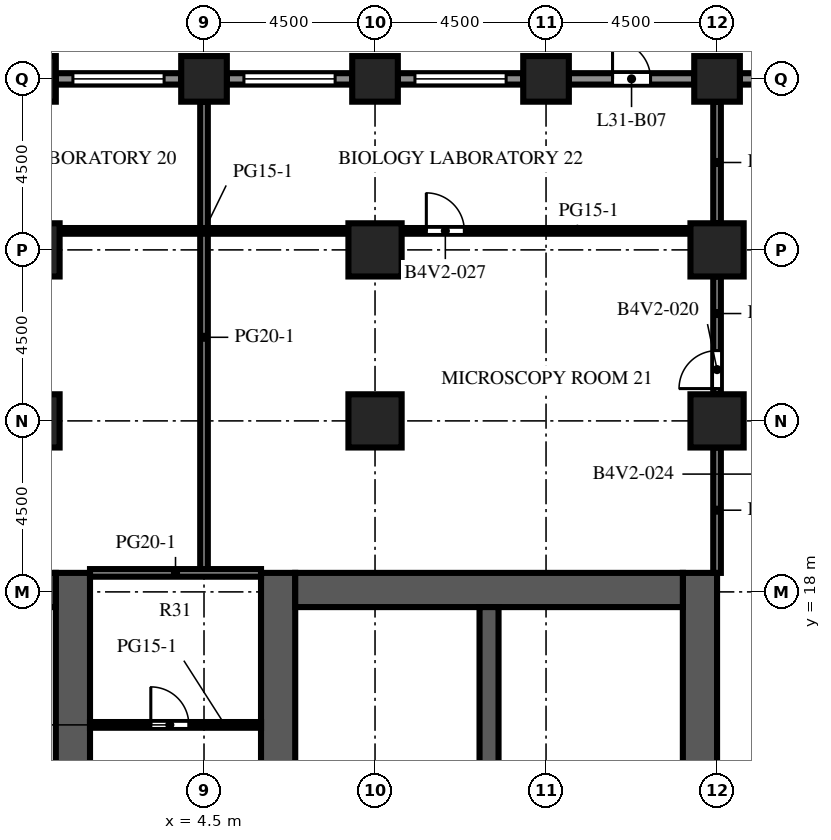
"""IFC4 building model, lengths in metres.
Left out: names, types, materials, properties, quantities, classifications, styles, units other than length and angle.
Written with IfcOpenShell. Run it as: python <this file> out.ifc"""

import sys

from ifc_helpers import new_model, si_unit, direction, frame, frame_2d, origin, origin_2d, place, context, subcontext, project, spatial, rectangle, extrude, element, fill, save


model = new_model("IFC4")
c1 = context("Model", 3, precision=1e-05, world=origin(), true_north=direction((0.0, 1.0)))
c2 = subcontext(c1, "Body", "Model", "MODEL_VIEW")
j1 = project(units=[si_unit("LENGTHUNIT", "METRE"), si_unit("PLANEANGLEUNIT", "RADIAN")], contexts=[c1])
p1 = place(None, origin())
s1 = spatial("IfcSite", under=j1, at=p1, CompositionType="ELEMENT")
p2 = place(p1, origin())
s2 = spatial("IfcBuilding", under=s1, at=p2, CompositionType="ELEMENT")
p3 = place(p2, frame((0.0, 0.0, 137.2)))
s3 = spatial("IfcBuildingStorey", under=s2, at=p3, CompositionType="ELEMENT", Elevation=137.2)
for number, where, z_axis, x_axis in (
    (1, (0.0, 31.5, 0.0), (0.0, 0.0, 1.0), (1.0, 0.0, 0.0)),
    (2, (4.5, 31.5, 0.0), (0.0, 0.0, 1.0), (1.0, 0.0, 0.0)),
    (3, (9.0, 31.5, 0.0), (0.0, 0.0, 1.0), (1.0, 0.0, 0.0)),
    (4, (13.5, 31.5, 0.0), (0.0, 0.0, 1.0), (1.0, 0.0, 0.0)),
    (5, (18.0, 31.5, 0.0), (0.0, 0.0, 1.0), (1.0, 0.0, 0.0)),
):
    element("IfcColumn", number, at=place(p3, frame(where, z_axis=z_axis, x_axis=x_axis)), inside=s3, PredefinedType="COLUMN", context=c2, shape_type="SweptSolid", body=[
        extrude(rectangle(XDim=1.2, YDim=1.2, at=origin_2d()), origin(), (0.0, 0.0, 1.0), 4.1),
    ])
for number, where, z_axis, x_axis in (
    (6, (0.0, 22.5, 0.0), (0.0, 0.0, 1.0), (1.0, 0.0, 0.0)),
    (7, (0.0, 27.0, 0.0), (0.0, 0.0, 1.0), (1.0, 0.0, 0.0)),
    (8, (9.0, 22.5, 0.0), (0.0, 0.0, 1.0), (1.0, 0.0, 0.0)),
    (9, (9.0, 27.0, 0.0), (0.0, 0.0, 1.0), (1.0, 0.0, 0.0)),
    (10, (18.0, 22.5, 0.0), (0.0, 0.0, 1.0), (1.0, 0.0, 0.0)),
    (11, (18.0, 27.0, 0.0), (0.0, 0.0, 1.0), (1.0, 0.0, 0.0)),
):
    element("IfcColumn", number, at=place(p3, frame(where, z_axis=z_axis, x_axis=x_axis)), inside=s3, PredefinedType="COLUMN", context=c2, shape_type="SweptSolid", body=[
        extrude(rectangle(XDim=1.4, YDim=1.4, at=origin_2d()), origin(), (0.0, 0.0, 1.0), 4.1),
    ])
p4 = place(p3, frame((1.05, -9.0, 0.0), z_axis=(0.0, 0.0, 1.0), x_axis=(0.0, 1.0, 0.0)))
e12 = element("IfcWall", 12, at=p4, inside=s3, PredefinedType="SHEAR", context=c2, shape_type="SweptSolid", body=[
    extrude(rectangle(XDim=27.5, YDim=0.9, at=frame_2d((13.75, 0.0))), origin(), (0.0, 0.0, 1.0), 4.1),
])
p5 = place(p4, frame((12.55, 0.0, 0.0)))
e13 = element("IfcOpeningElement", 13, at=p5, cuts=e12, PredefinedType="OPENING", context=c2, shape_type="SweptSolid", body=[
    extrude(rectangle(XDim=2.4, YDim=2.4, at=frame_2d((1.2, 1.2))), frame((0.0, 0.46, 0.0), z_axis=(0.0, -1.0, 0.0), x_axis=(1.0, 0.0, 0.0)), (0.0, 0.0, 1.0), 0.92),
])
p6 = place(p4, frame((5.51, 0.0, 0.0)))
e14 = element("IfcOpeningElement", 14, at=p6, cuts=e12, PredefinedType="OPENING", context=c2, shape_type="SweptSolid", body=[
    extrude(rectangle(XDim=0.923, YDim=2.1, at=frame_2d((0.461, 1.05))), frame((0.0, 0.46, 0.0), z_axis=(0.0, -1.0, 0.0), x_axis=(1.0, 0.0, 0.0)), (0.0, 0.0, 1.0), 0.92),
])
p7 = place(p4, frame((23.427, 0.0, 0.0)))
e15 = element("IfcOpeningElement", 15, at=p7, cuts=e12, PredefinedType="OPENING", context=c2, shape_type="SweptSolid", body=[
    extrude(rectangle(XDim=1.2, YDim=2.1, at=frame_2d((0.6, 1.05))), frame((0.0, 0.46, 0.0), z_axis=(0.0, -1.0, 0.0), x_axis=(1.0, 0.0, 0.0)), (0.0, 0.0, 1.0), 0.92),
])
p8 = place(p3, frame((-9.6, 18.05, 0.0), z_axis=(0.0, 0.0, 1.0), x_axis=(1.0, 0.0, 0.0)))
e16 = element("IfcWall", 16, at=p8, inside=s3, PredefinedType="SHEAR", context=c2, shape_type="SweptSolid", body=[
    extrude(rectangle(XDim=10.2, YDim=0.9, at=frame_2d((5.1, 0.0))), origin(), (0.0, 0.0, 1.0), 4.1),
])
p9 = place(p3, frame((6.45, -9.0, 0.0), z_axis=(0.0, 0.0, 1.0), x_axis=(0.0, 1.0, 0.0)))
e17 = element("IfcWall", 17, at=p9, inside=s3, PredefinedType="SHEAR", context=c2, shape_type="SweptSolid", body=[
    extrude(rectangle(XDim=27.5, YDim=0.9, at=frame_2d((13.75, 0.0))), origin(), (0.0, 0.0, 1.0), 4.1),
])
p10 = place(p9, frame((12.55, 0.0, 0.0)))
e18 = element("IfcOpeningElement", 18, at=p10, cuts=e17, PredefinedType="OPENING", context=c2, shape_type="SweptSolid", body=[
    extrude(rectangle(XDim=2.4, YDim=2.4, at=frame_2d((1.2, 1.2))), frame((0.0, 0.46, 0.0), z_axis=(0.0, -1.0, 0.0), x_axis=(1.0, 0.0, 0.0)), (0.0, 0.0, 1.0), 0.92),
])
p11 = place(p9, frame((5.51, 0.0, 0.0)))
e19 = element("IfcOpeningElement", 19, at=p11, cuts=e17, PredefinedType="OPENING", context=c2, shape_type="SweptSolid", body=[
    extrude(rectangle(XDim=0.923, YDim=2.1, at=frame_2d((0.461, 1.05))), frame((0.0, 0.46, 0.0), z_axis=(0.0, -1.0, 0.0), x_axis=(1.0, 0.0, 0.0)), (0.0, 0.0, 1.0), 0.92),
])
p12 = place(p9, frame((23.427, 0.0, 0.0)))
e20 = element("IfcOpeningElement", 20, at=p12, cuts=e17, PredefinedType="OPENING", context=c2, shape_type="SweptSolid", body=[
    extrude(rectangle(XDim=1.2, YDim=2.1, at=frame_2d((0.6, 1.05))), frame((0.0, 0.46, 0.0), z_axis=(0.0, -1.0, 0.0), x_axis=(1.0, 0.0, 0.0)), (0.0, 0.0, 1.0), 0.92),
])
p13 = place(p3, frame((17.55, -9.0, 0.0), z_axis=(0.0, 0.0, 1.0), x_axis=(0.0, 1.0, 0.0)))
e21 = element("IfcWall", 21, at=p13, inside=s3, PredefinedType="SHEAR", context=c2, shape_type="SweptSolid", body=[
    extrude(rectangle(XDim=27.5, YDim=0.9, at=frame_2d((13.75, 0.0))), origin(), (0.0, 0.0, 1.0), 4.1),
])
p14 = place(p13, frame((12.55, 0.0, 0.0)))
e22 = element("IfcOpeningElement", 22, at=p14, cuts=e21, PredefinedType="OPENING", context=c2, shape_type="SweptSolid", body=[
    extrude(rectangle(XDim=2.4, YDim=2.4, at=frame_2d((1.2, 1.2))), frame((0.0, 0.46, 0.0), z_axis=(0.0, -1.0, 0.0), x_axis=(1.0, 0.0, 0.0)), (0.0, 0.0, 1.0), 0.92),
])
p15 = place(p13, frame((6.825, 0.0, 0.0)))
e23 = element("IfcOpeningElement", 23, at=p15, cuts=e21, PredefinedType="OPENING", context=c2, shape_type="SweptSolid", body=[
    extrude(rectangle(XDim=1.2, YDim=2.1, at=frame_2d((0.6, 1.05))), frame((0.0, 0.46, 0.0), z_axis=(0.0, -1.0, 0.0), x_axis=(1.0, 0.0, 0.0)), (0.0, 0.0, 1.0), 0.92),
])
p16 = place(p13, frame((19.475, 0.0, 0.0)))
e24 = element("IfcOpeningElement", 24, at=p16, cuts=e21, PredefinedType="OPENING", context=c2, shape_type="SweptSolid", body=[
    extrude(rectangle(XDim=1.2, YDim=2.1, at=frame_2d((0.6, 1.05))), frame((0.0, 0.46, 0.0), z_axis=(0.0, -1.0, 0.0), x_axis=(1.0, 0.0, 0.0)), (0.0, 0.0, 1.0), 0.92),
])
p17 = place(p3, frame((6.9, 18.05, 0.0), z_axis=(0.0, 0.0, 1.0), x_axis=(1.0, 0.0, 0.0)))
e25 = element("IfcWall", 25, at=p17, inside=s3, PredefinedType="SHEAR", context=c2, shape_type="SweptSolid", body=[
    extrude(rectangle(XDim=10.2, YDim=0.9, at=frame_2d((5.1, 0.0))), origin(), (0.0, 0.0, 1.0), 4.1),
])
p18 = place(p3, frame((12.0, 10.25, 0.0), z_axis=(0.0, 0.0, 1.0), x_axis=(0.0, 1.0, 0.0)))
e26 = element("IfcWall", 26, at=p18, inside=s3, PredefinedType="SHEAR", context=c2, shape_type="SweptSolid", body=[
    extrude(rectangle(XDim=7.35, YDim=0.5, at=frame_2d((3.675, 0.0))), origin(), (0.0, 0.0, 1.0), 4.1),
])
p19 = place(p3, frame((18.6, 31.5, 0.0), z_axis=(0.0, 0.0, 1.0), x_axis=(1.0, 0.0, 0.0)))
e27 = element("IfcWall", 27, at=p19, inside=s3, PredefinedType="SOLIDWALL", context=c2, shape_type="SweptSolid", body=[
    extrude(rectangle(XDim=3.3, YDim=0.3, at=frame_2d((1.65, 0.0))), origin(), (0.0, 0.0, 1.0), 2.75),
])
p20 = place(p19, frame((0.525, 0.0, 0.8)))
e28 = element("IfcOpeningElement", 28, at=p20, cuts=e27, PredefinedType="OPENING", context=c2, shape_type="SweptSolid", body=[
    extrude(rectangle(XDim=1.2, YDim=1.7, at=frame_2d((0.6, 0.85))), frame((0.0, 0.16, 0.0), z_axis=(0.0, -1.0, 0.0), x_axis=(1.0, 0.0, 0.0)), (0.0, 0.0, 1.0), 0.32),
])
p21 = place(p3, frame((14.1, 31.5, 0.0), z_axis=(0.0, 0.0, 1.0), x_axis=(1.0, 0.0, 0.0)))
e29 = element("IfcWall", 29, at=p21, inside=s3, PredefinedType="SOLIDWALL", context=c2, shape_type="SweptSolid", body=[
    extrude(rectangle(XDim=3.3, YDim=0.3, at=frame_2d((1.65, 0.0))), origin(), (0.0, 0.0, 1.0), 2.75),
])
p22 = place(p21, frame((1.15, 0.0, 0.0)))
e30 = element("IfcOpeningElement", 30, at=p22, cuts=e29, PredefinedType="OPENING", context=c2, shape_type="SweptSolid", body=[
    extrude(rectangle(XDim=1.0, YDim=2.2, at=frame_2d((0.5, 1.1))), frame((0.0, 0.16, 0.0), z_axis=(0.0, -1.0, 0.0), x_axis=(1.0, 0.0, 0.0)), (0.0, 0.0, 1.0), 0.32),
])
p23 = place(p3, frame((9.6, 31.5, 0.0), z_axis=(0.0, 0.0, 1.0), x_axis=(1.0, 0.0, 0.0)))
e31 = element("IfcWall", 31, at=p23, inside=s3, PredefinedType="SOLIDWALL", context=c2, shape_type="SweptSolid", body=[
    extrude(rectangle(XDim=3.3, YDim=0.3, at=frame_2d((1.65, 0.0))), origin(), (0.0, 0.0, 1.0), 2.75),
])
p24 = place(p23, frame((0.45, 0.0, 0.8)))
e32 = element("IfcOpeningElement", 32, at=p24, cuts=e31, PredefinedType="OPENING", context=c2, shape_type="SweptSolid", body=[
    extrude(rectangle(XDim=2.4, YDim=1.7, at=frame_2d((1.2, 0.85))), frame((0.0, 0.16, 0.0), z_axis=(0.0, -1.0, 0.0), x_axis=(1.0, 0.0, 0.0)), (0.0, 0.0, 1.0), 0.32),
])
p25 = place(p3, frame((5.1, 31.5, 0.0), z_axis=(0.0, 0.0, 1.0), x_axis=(1.0, 0.0, 0.0)))
e33 = element("IfcWall", 33, at=p25, inside=s3, PredefinedType="SOLIDWALL", context=c2, shape_type="SweptSolid", body=[
    extrude(rectangle(XDim=3.3, YDim=0.3, at=frame_2d((1.65, 0.0))), origin(), (0.0, 0.0, 1.0), 2.75),
])
p26 = place(p25, frame((0.45, 0.0, 0.8)))
e34 = element("IfcOpeningElement", 34, at=p26, cuts=e33, PredefinedType="OPENING", context=c2, shape_type="SweptSolid", body=[
    extrude(rectangle(XDim=2.4, YDim=1.7, at=frame_2d((1.2, 0.85))), frame((0.0, 0.16, 0.0), z_axis=(0.0, -1.0, 0.0), x_axis=(1.0, 0.0, 0.0)), (0.0, 0.0, 1.0), 0.32),
])
p27 = place(p3, frame((0.6, 31.5, 0.0), z_axis=(0.0, 0.0, 1.0), x_axis=(1.0, 0.0, 0.0)))
e35 = element("IfcWall", 35, at=p27, inside=s3, PredefinedType="SOLIDWALL", context=c2, shape_type="SweptSolid", body=[
    extrude(rectangle(XDim=3.3, YDim=0.3, at=frame_2d((1.65, 0.0))), origin(), (0.0, 0.0, 1.0), 2.75),
])
p28 = place(p27, frame((0.45, 0.0, 0.8)))
e36 = element("IfcOpeningElement", 36, at=p28, cuts=e35, PredefinedType="OPENING", context=c2, shape_type="SweptSolid", body=[
    extrude(rectangle(XDim=2.4, YDim=1.7, at=frame_2d((1.2, 0.85))), frame((0.0, 0.16, 0.0), z_axis=(0.0, -1.0, 0.0), x_axis=(1.0, 0.0, 0.0)), (0.0, 0.0, 1.0), 0.32),
])
p29 = place(p3, frame((8.2, 12.455, 0.0), z_axis=(0.0, 0.0, 1.0), x_axis=(0.0, 1.0, 0.0)))
e37 = element("IfcWall", 37, at=p29, inside=s3, PredefinedType="PARTITIONING", context=c2, shape_type="SweptSolid", body=[
    extrude(rectangle(XDim=2.573, YDim=0.1, at=frame_2d((1.286, 0.0))), origin(), (0.0, 0.0, 1.0), 3.65),
])
p30 = place(p29, frame((0.786, 0.0, 0.0)))
e38 = element("IfcOpeningElement", 38, at=p30, cuts=e37, PredefinedType="OPENING", context=c2, shape_type="SweptSolid", body=[
    extrude(rectangle(XDim=1.0, YDim=2.1, at=frame_2d((0.5, 1.05))), frame((0.0, 0.06, 0.0), z_axis=(0.0, -1.0, 0.0), x_axis=(1.0, 0.0, 0.0)), (0.0, 0.0, 1.0), 0.12),
])
p31 = place(p3, frame((8.2, 15.028, 0.0), z_axis=(0.0, 0.0, 1.0), x_axis=(0.0, 1.0, 0.0)))
e39 = element("IfcWall", 39, at=p31, inside=s3, PredefinedType="PARTITIONING", context=c2, shape_type="SweptSolid", body=[
    extrude(rectangle(XDim=2.573, YDim=0.1, at=frame_2d((1.286, 0.0))), origin(), (0.0, 0.0, 1.0), 3.65),
])
p32 = place(p31, frame((0.786, 0.0, 0.0)))
e40 = element("IfcOpeningElement", 40, at=p32, cuts=e39, PredefinedType="OPENING", context=c2, shape_type="SweptSolid", body=[
    extrude(rectangle(XDim=1.0, YDim=2.1, at=frame_2d((0.5, 1.05))), frame((0.0, 0.06, 0.0), z_axis=(0.0, -1.0, 0.0), x_axis=(1.0, 0.0, 0.0)), (0.0, 0.0, 1.0), 0.12),
])
p33 = place(p3, frame((8.2, 15.028, 0.0), z_axis=(0.0, 0.0, 1.0), x_axis=(1.0, 0.0, 0.0)))
e41 = element("IfcWall", 41, at=p33, inside=s3, PredefinedType="PARTITIONING", context=c2, shape_type="SweptSolid", body=[
    extrude(rectangle(XDim=3.55, YDim=0.1, at=frame_2d((1.775, 0.0))), origin(), (0.0, 0.0, 1.0), 3.65),
])
p34 = place(p3, frame((4.5, 18.5, 0.0), z_axis=(0.0, 0.0, 1.0), x_axis=(0.0, 1.0, 0.0)))
e42 = element("IfcWall", 42, at=p34, inside=s3, PredefinedType="PARTITIONING", context=c2, shape_type="SweptSolid", body=[
    extrude(rectangle(XDim=12.4, YDim=0.2, at=frame_2d((6.2, 0.0))), origin(), (0.0, 0.0, 1.0), 3.65),
])
p35 = place(p3, frame((18.0, 18.5, 0.0), z_axis=(0.0, 0.0, 1.0), x_axis=(0.0, 1.0, 0.0)))
e43 = element("IfcWall", 43, at=p35, inside=s3, PredefinedType="PARTITIONING", context=c2, shape_type="SweptSolid", body=[
    extrude(rectangle(XDim=3.3, YDim=0.2, at=frame_2d((1.65, 0.0))), origin(), (0.0, 0.0, 1.0), 3.65),
])
p36 = place(p3, frame((18.0, 23.2, 0.0), z_axis=(0.0, 0.0, 1.0), x_axis=(0.0, 1.0, 0.0)))
e44 = element("IfcWall", 44, at=p36, inside=s3, PredefinedType="PARTITIONING", context=c2, shape_type="SweptSolid", body=[
    extrude(rectangle(XDim=3.1, YDim=0.2, at=frame_2d((1.55, 0.0))), origin(), (0.0, 0.0, 1.0), 3.65),
])
p37 = place(p36, frame((0.15, 0.0, 0.0)))
e45 = element("IfcOpeningElement", 45, at=p37, cuts=e44, PredefinedType="OPENING", context=c2, shape_type="SweptSolid", body=[
    extrude(rectangle(XDim=1.0, YDim=2.1, at=frame_2d((0.5, 1.05))), frame((0.0, 0.11, 0.0), z_axis=(0.0, -1.0, 0.0), x_axis=(1.0, 0.0, 0.0)), (0.0, 0.0, 1.0), 0.22),
])
p38 = place(p3, frame((18.0, 27.7, 0.0), z_axis=(0.0, 0.0, 1.0), x_axis=(0.0, 1.0, 0.0)))
e46 = element("IfcWall", 46, at=p38, inside=s3, PredefinedType="PARTITIONING", context=c2, shape_type="SweptSolid", body=[
    extrude(rectangle(XDim=3.2, YDim=0.2, at=frame_2d((1.6, 0.0))), origin(), (0.0, 0.0, 1.0), 3.65),
])
p39 = place(p3, frame((1.5, 14.5, 0.0), z_axis=(0.0, 0.0, 1.0), x_axis=(1.0, 0.0, 0.0)))
e47 = element("IfcWall", 47, at=p39, inside=s3, PredefinedType="PARTITIONING", context=c2, shape_type="SweptSolid", body=[
    extrude(rectangle(XDim=4.5, YDim=0.15, at=frame_2d((2.25, 0.0))), origin(), (0.0, 0.0, 1.0), 3.65),
])
p40 = place(p39, frame((1.6, 0.0, 0.0)))
e48 = element("IfcOpeningElement", 48, at=p40, cuts=e47, PredefinedType="OPENING", context=c2, shape_type="SweptSolid", body=[
    extrude(rectangle(XDim=1.0, YDim=2.1, at=frame_2d((0.5, 1.05))), frame((0.0, 0.085, 0.0), z_axis=(0.0, -1.0, 0.0), x_axis=(1.0, 0.0, 0.0)), (0.0, 0.0, 1.0), 0.17),
])
p41 = place(p3, frame((1.5, 18.5, 0.0), z_axis=(0.0, 0.0, 1.0), x_axis=(1.0, 0.0, 0.0)))
e49 = element("IfcWall", 49, at=p41, inside=s3, PredefinedType="PARTITIONING", context=c2, shape_type="SweptSolid", body=[
    extrude(rectangle(XDim=4.5, YDim=0.2, at=frame_2d((2.25, 0.0))), origin(), (0.0, 0.0, 1.0), 3.65),
])
p42 = place(p3, frame((0.7, 27.5, 0.0), z_axis=(0.0, 0.0, 1.0), x_axis=(1.0, 0.0, 0.0)))
e50 = element("IfcWall", 50, at=p42, inside=s3, PredefinedType="PARTITIONING", context=c2, shape_type="SweptSolid", body=[
    extrude(rectangle(XDim=7.6, YDim=0.15, at=frame_2d((3.8, 0.0))), origin(), (0.0, 0.0, 1.0), 3.65),
])
p43 = place(p3, frame((9.7, 27.5, 0.0), z_axis=(0.0, 0.0, 1.0), x_axis=(1.0, 0.0, 0.0)))
e51 = element("IfcWall", 51, at=p43, inside=s3, PredefinedType="PARTITIONING", context=c2, shape_type="SweptSolid", body=[
    extrude(rectangle(XDim=7.6, YDim=0.15, at=frame_2d((3.8, 0.0))), origin(), (0.0, 0.0, 1.0), 3.65),
])
p44 = place(p43, frame((0.65, 0.0, 0.0)))
e52 = element("IfcOpeningElement", 52, at=p44, cuts=e51, PredefinedType="OPENING", context=c2, shape_type="SweptSolid", body=[
    extrude(rectangle(XDim=1.0, YDim=2.1, at=frame_2d((0.5, 1.05))), frame((0.0, 0.085, 0.0), z_axis=(0.0, -1.0, 0.0), x_axis=(1.0, 0.0, 0.0)), (0.0, 0.0, 1.0), 0.17),
])
p45 = place(p22, origin())
e53 = element("IfcDoor", 53, at=p45, inside=s3, OperationType="SINGLE_SWING_LEFT", PredefinedType="DOOR", context=c2, shape_type="SweptSolid", body=[
    extrude(rectangle(XDim=1.0, YDim=2.2, at=frame_2d((0.5, 1.1))), frame((0.0, 0.025, 0.0), z_axis=(0.0, -1.0, 0.0), x_axis=(1.0, 0.0, 0.0)), (0.0, 0.0, 1.0), 0.05),
])
fill(e30, e53)
p46 = place(p24, origin())
e54 = element("IfcWindow", 54, at=p46, inside=s3, PartitioningType="SINGLE_PANEL", PredefinedType="WINDOW", context=c2, shape_type="SweptSolid", body=[
    extrude(rectangle(XDim=2.4, YDim=1.7, at=frame_2d((1.2, 0.85))), frame((0.0, 0.03, 0.0), z_axis=(0.0, -1.0, 0.0), x_axis=(1.0, 0.0, 0.0)), (0.0, 0.0, 1.0), 0.06),
])
fill(e32, e54)
p47 = place(p26, origin())
e55 = element("IfcWindow", 55, at=p47, inside=s3, PartitioningType="SINGLE_PANEL", PredefinedType="WINDOW", context=c2, shape_type="SweptSolid", body=[
    extrude(rectangle(XDim=2.4, YDim=1.7, at=frame_2d((1.2, 0.85))), frame((0.0, 0.03, 0.0), z_axis=(0.0, -1.0, 0.0), x_axis=(1.0, 0.0, 0.0)), (0.0, 0.0, 1.0), 0.06),
])
fill(e34, e55)
p48 = place(p28, origin())
e56 = element("IfcWindow", 56, at=p48, inside=s3, PartitioningType="SINGLE_PANEL", PredefinedType="WINDOW", context=c2, shape_type="SweptSolid", body=[
    extrude(rectangle(XDim=2.4, YDim=1.7, at=frame_2d((1.2, 0.85))), frame((0.0, 0.03, 0.0), z_axis=(0.0, -1.0, 0.0), x_axis=(1.0, 0.0, 0.0)), (0.0, 0.0, 1.0), 0.06),
])
fill(e36, e56)
p49 = place(p7, origin())
e57 = element("IfcDoor", 57, at=p49, inside=s3, OperationType="SINGLE_SWING_RIGHT", PredefinedType="DOOR", context=c2, shape_type="SweptSolid", body=[
    extrude(rectangle(XDim=1.2, YDim=2.1, at=frame_2d((0.6, 1.05))), frame((0.0, 0.425, 0.0), z_axis=(0.0, -1.0, 0.0), x_axis=(1.0, 0.0, 0.0)), (0.0, 0.0, 1.0), 0.05),
])
fill(e15, e57)
p50 = place(p12, origin())
e58 = element("IfcDoor", 58, at=p50, inside=s3, OperationType="SINGLE_SWING_LEFT", PredefinedType="DOOR", context=c2, shape_type="SweptSolid", body=[
    extrude(rectangle(XDim=1.2, YDim=2.1, at=frame_2d((0.6, 1.05))), frame((0.0, -0.375, 0.0), z_axis=(0.0, -1.0, 0.0), x_axis=(1.0, 0.0, 0.0)), (0.0, 0.0, 1.0), 0.05),
])
fill(e20, e58)
p51 = place(p30, origin())
e59 = element("IfcDoor", 59, at=p51, inside=s3, OperationType="SINGLE_SWING_RIGHT", PredefinedType="DOOR", context=c2, shape_type="SweptSolid", body=[
    extrude(rectangle(XDim=1.0, YDim=2.1, at=frame_2d((0.5, 1.05))), frame((0.0, 0.025, 0.0), z_axis=(0.0, -1.0, 0.0), x_axis=(1.0, 0.0, 0.0)), (0.0, 0.0, 1.0), 0.05),
])
fill(e38, e59)
p52 = place(p32, origin())
e60 = element("IfcDoor", 60, at=p52, inside=s3, OperationType="SINGLE_SWING_LEFT", PredefinedType="DOOR", context=c2, shape_type="SweptSolid", body=[
    extrude(rectangle(XDim=1.0, YDim=2.1, at=frame_2d((0.5, 1.05))), frame((0.0, 0.025, 0.0), z_axis=(0.0, -1.0, 0.0), x_axis=(1.0, 0.0, 0.0)), (0.0, 0.0, 1.0), 0.05),
])
fill(e40, e60)
p53 = place(p40, origin())
e61 = element("IfcDoor", 61, at=p53, inside=s3, OperationType="SINGLE_SWING_LEFT", PredefinedType="DOOR", context=c2, shape_type="SweptSolid", body=[
    extrude(rectangle(XDim=1.0, YDim=2.1, at=frame_2d((0.5, 1.05))), frame((0.0, 0.025, 0.0), z_axis=(0.0, -1.0, 0.0), x_axis=(1.0, 0.0, 0.0)), (0.0, 0.0, 1.0), 0.05),
])
fill(e48, e61)
p54 = place(p37, origin())
e62 = element("IfcDoor", 62, at=p54, inside=s3, OperationType="SINGLE_SWING_LEFT", PredefinedType="DOOR", context=c2, shape_type="SweptSolid", body=[
    extrude(rectangle(XDim=1.0, YDim=2.1, at=frame_2d((0.5, 1.05))), frame((0.0, 0.025, 0.0), z_axis=(0.0, -1.0, 0.0), x_axis=(1.0, 0.0, 0.0)), (0.0, 0.0, 1.0), 0.05),
])
fill(e45, e62)
p55 = place(p44, origin())
e63 = element("IfcDoor", 63, at=p55, inside=s3, OperationType="SINGLE_SWING_LEFT", PredefinedType="DOOR", context=c2, shape_type="SweptSolid", body=[
    extrude(rectangle(XDim=1.0, YDim=2.1, at=frame_2d((0.5, 1.05))), frame((0.0, 0.025, 0.0), z_axis=(0.0, -1.0, 0.0), x_axis=(1.0, 0.0, 0.0)), (0.0, 0.0, 1.0), 0.05),
])
fill(e52, e63)
save(model, sys.argv[1])
